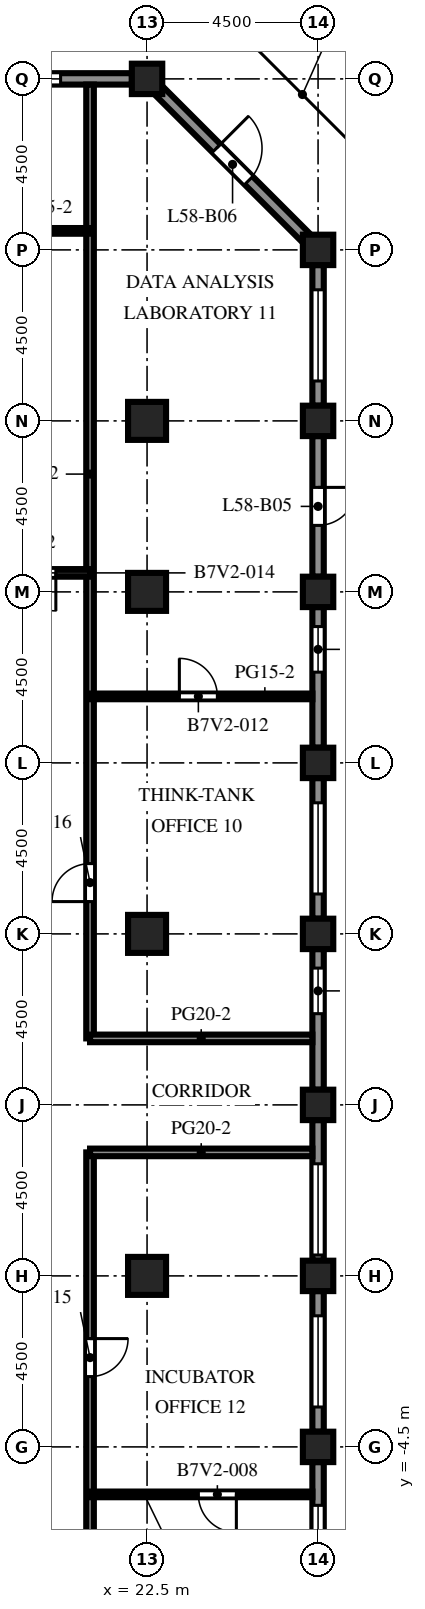
"""IFC4 building model, lengths in metres.
Left out: names, types, materials, properties, quantities, classifications, styles, units other than length and angle.
Written with IfcOpenShell. Run it as: python <this file> out.ifc"""

import sys

from ifc_helpers import new_model, si_unit, direction, frame, frame_2d, origin, origin_2d, place, context, subcontext, project, spatial, rectangle, extrude, element, fill, save


model = new_model("IFC4")
c1 = context("Model", 3, precision=1e-05, world=origin(), true_north=direction((0.0, 1.0)))
c2 = subcontext(c1, "Body", "Model", "MODEL_VIEW")
j1 = project(units=[si_unit("LENGTHUNIT", "METRE"), si_unit("PLANEANGLEUNIT", "RADIAN")], contexts=[c1])
p1 = place(None, origin())
s1 = spatial("IfcSite", under=j1, at=p1, CompositionType="ELEMENT")
p2 = place(p1, origin())
s2 = spatial("IfcBuilding", under=s1, at=p2, CompositionType="ELEMENT")
p3 = place(p2, frame((0.0, 0.0, 256.2)))
s3 = spatial("IfcBuildingStorey", under=s2, at=p3, CompositionType="ELEMENT", Elevation=256.2)
for number, where, z_axis, x_axis in (
    (1, (22.5, 31.5, 0.0), (0.0, 0.0, 1.0), (1.0, 0.0, 0.0)),
    (2, (27.0, -4.5, 0.0), (0.0, 0.0, 1.0), (1.0, 0.0, 0.0)),
    (3, (27.0, 0.0, 0.0), (0.0, 0.0, 1.0), (1.0, 0.0, 0.0)),
    (4, (27.0, 4.5, 0.0), (0.0, 0.0, 1.0), (1.0, 0.0, 0.0)),
    (5, (27.0, 9.0, 0.0), (0.0, 0.0, 1.0), (1.0, 0.0, 0.0)),
    (6, (27.0, 13.5, 0.0), (0.0, 0.0, 1.0), (1.0, 0.0, 0.0)),
    (7, (27.0, 18.0, 0.0), (0.0, 0.0, 1.0), (1.0, 0.0, 0.0)),
    (8, (27.0, 22.5, 0.0), (0.0, 0.0, 1.0), (1.0, 0.0, 0.0)),
    (9, (27.0, 27.0, 0.0), (0.0, 0.0, 1.0), (1.0, 0.0, 0.0)),
):
    element("IfcColumn", number, at=place(p3, frame(where, z_axis=z_axis, x_axis=x_axis)), inside=s3, PredefinedType="COLUMN", context=c2, shape_type="SweptSolid", body=[
        extrude(rectangle(XDim=0.8, YDim=0.8, at=origin_2d()), origin(), (0.0, 0.0, 1.0), 4.1),
    ])
for number, where, z_axis, x_axis in (
    (10, (22.5, 0.0, 0.0), (0.0, 0.0, 1.0), (1.0, 0.0, 0.0)),
    (11, (22.5, 9.0, 0.0), (0.0, 0.0, 1.0), (1.0, 0.0, 0.0)),
    (12, (22.5, 18.0, 0.0), (0.0, 0.0, 1.0), (1.0, 0.0, 0.0)),
    (13, (22.5, 22.5, 0.0), (0.0, 0.0, 1.0), (1.0, 0.0, 0.0)),
):
    element("IfcColumn", number, at=place(p3, frame(where, z_axis=z_axis, x_axis=x_axis)), inside=s3, PredefinedType="COLUMN", context=c2, shape_type="SweptSolid", body=[
        extrude(rectangle(XDim=1.0, YDim=1.0, at=origin_2d()), origin(), (0.0, 0.0, 1.0), 4.1),
    ])
p4 = place(p3, frame((27.0, -4.9, 0.0), z_axis=(0.0, 0.0, 1.0), x_axis=(0.0, -1.0, 0.0)))
e14 = element("IfcWall", 14, at=p4, inside=s3, PredefinedType="SOLIDWALL", context=c2, shape_type="SweptSolid", body=[
    extrude(rectangle(XDim=3.7, YDim=0.3, at=frame_2d((1.85, 0.0))), origin(), (0.0, 0.0, 1.0), 2.7),
])
p5 = place(p4, frame((1.137, 0.0, 0.8)))
e15 = element("IfcOpeningElement", 15, at=p5, cuts=e14, PredefinedType="OPENING", context=c2, shape_type="SweptSolid", body=[
    extrude(rectangle(XDim=2.4, YDim=1.7, at=frame_2d((1.2, 0.85))), frame((0.0, 0.16, 0.0), z_axis=(0.0, -1.0, 0.0), x_axis=(1.0, 0.0, 0.0)), (0.0, 0.0, 1.0), 0.32),
])
p6 = place(p3, frame((27.0, -0.4, 0.0), z_axis=(0.0, 0.0, 1.0), x_axis=(0.0, -1.0, 0.0)))
e16 = element("IfcWall", 16, at=p6, inside=s3, PredefinedType="SOLIDWALL", context=c2, shape_type="SweptSolid", body=[
    extrude(rectangle(XDim=3.7, YDim=0.3, at=frame_2d((1.85, 0.0))), origin(), (0.0, 0.0, 1.0), 2.7),
])
p7 = place(p6, frame((0.65, 0.0, 0.8)))
e17 = element("IfcOpeningElement", 17, at=p7, cuts=e16, PredefinedType="OPENING", context=c2, shape_type="SweptSolid", body=[
    extrude(rectangle(XDim=2.4, YDim=1.7, at=frame_2d((1.2, 0.85))), frame((0.0, 0.16, 0.0), z_axis=(0.0, -1.0, 0.0), x_axis=(1.0, 0.0, 0.0)), (0.0, 0.0, 1.0), 0.32),
])
p8 = place(p3, frame((27.0, 4.1, 0.0), z_axis=(0.0, 0.0, 1.0), x_axis=(0.0, -1.0, 0.0)))
e18 = element("IfcWall", 18, at=p8, inside=s3, PredefinedType="SOLIDWALL", context=c2, shape_type="SweptSolid", body=[
    extrude(rectangle(XDim=3.7, YDim=0.3, at=frame_2d((1.85, 0.0))), origin(), (0.0, 0.0, 1.0), 2.7),
])
p9 = place(p8, frame((1.15, 0.0, 0.8)))
e19 = element("IfcOpeningElement", 19, at=p9, cuts=e18, PredefinedType="OPENING", context=c2, shape_type="SweptSolid", body=[
    extrude(rectangle(XDim=2.4, YDim=1.7, at=frame_2d((1.2, 0.85))), frame((0.0, 0.16, 0.0), z_axis=(0.0, -1.0, 0.0), x_axis=(1.0, 0.0, 0.0)), (0.0, 0.0, 1.0), 0.32),
])
p10 = place(p3, frame((27.0, 8.6, 0.0), z_axis=(0.0, 0.0, 1.0), x_axis=(0.0, -1.0, 0.0)))
e20 = element("IfcWall", 20, at=p10, inside=s3, PredefinedType="SOLIDWALL", context=c2, shape_type="SweptSolid", body=[
    extrude(rectangle(XDim=3.7, YDim=0.3, at=frame_2d((1.85, 0.0))), origin(), (0.0, 0.0, 1.0), 2.7),
])
p11 = place(p10, frame((0.5, 0.0, 0.8)))
e21 = element("IfcOpeningElement", 21, at=p11, cuts=e20, PredefinedType="OPENING", context=c2, shape_type="SweptSolid", body=[
    extrude(rectangle(XDim=1.2, YDim=1.7, at=frame_2d((0.6, 0.85))), frame((0.0, 0.16, 0.0), z_axis=(0.0, -1.0, 0.0), x_axis=(1.0, 0.0, 0.0)), (0.0, 0.0, 1.0), 0.32),
])
p12 = place(p3, frame((27.0, 13.1, 0.0), z_axis=(0.0, 0.0, 1.0), x_axis=(0.0, -1.0, 0.0)))
e22 = element("IfcWall", 22, at=p12, inside=s3, PredefinedType="SOLIDWALL", context=c2, shape_type="SweptSolid", body=[
    extrude(rectangle(XDim=3.7, YDim=0.3, at=frame_2d((1.85, 0.0))), origin(), (0.0, 0.0, 1.0), 2.7),
])
p13 = place(p12, frame((0.65, 0.0, 0.8)))
e23 = element("IfcOpeningElement", 23, at=p13, cuts=e22, PredefinedType="OPENING", context=c2, shape_type="SweptSolid", body=[
    extrude(rectangle(XDim=2.4, YDim=1.7, at=frame_2d((1.2, 0.85))), frame((0.0, 0.16, 0.0), z_axis=(0.0, -1.0, 0.0), x_axis=(1.0, 0.0, 0.0)), (0.0, 0.0, 1.0), 0.32),
])
p14 = place(p3, frame((27.0, 17.6, 0.0), z_axis=(0.0, 0.0, 1.0), x_axis=(0.0, -1.0, 0.0)))
e24 = element("IfcWall", 24, at=p14, inside=s3, PredefinedType="SOLIDWALL", context=c2, shape_type="SweptSolid", body=[
    extrude(rectangle(XDim=3.7, YDim=0.3, at=frame_2d((1.85, 0.0))), origin(), (0.0, 0.0, 1.0), 2.7),
])
p15 = place(p14, frame((0.512, 0.0, 0.8)))
e25 = element("IfcOpeningElement", 25, at=p15, cuts=e24, PredefinedType="OPENING", context=c2, shape_type="SweptSolid", body=[
    extrude(rectangle(XDim=1.2, YDim=1.7, at=frame_2d((0.6, 0.85))), frame((0.0, 0.16, 0.0), z_axis=(0.0, -1.0, 0.0), x_axis=(1.0, 0.0, 0.0)), (0.0, 0.0, 1.0), 0.32),
])
p16 = place(p3, frame((27.0, 22.1, 0.0), z_axis=(0.0, 0.0, 1.0), x_axis=(0.0, -1.0, 0.0)))
e26 = element("IfcWall", 26, at=p16, inside=s3, PredefinedType="SOLIDWALL", context=c2, shape_type="SweptSolid", body=[
    extrude(rectangle(XDim=3.7, YDim=0.3, at=frame_2d((1.85, 0.0))), origin(), (0.0, 0.0, 1.0), 2.7),
])
p17 = place(p16, frame((1.35, 0.0, 0.0)))
e27 = element("IfcOpeningElement", 27, at=p17, cuts=e26, PredefinedType="OPENING", context=c2, shape_type="SweptSolid", body=[
    extrude(rectangle(XDim=1.0, YDim=2.2, at=frame_2d((0.5, 1.1))), frame((0.0, 0.16, 0.0), z_axis=(0.0, -1.0, 0.0), x_axis=(1.0, 0.0, 0.0)), (0.0, 0.0, 1.0), 0.32),
])
p18 = place(p3, frame((27.0, 26.6, 0.0), z_axis=(0.0, 0.0, 1.0), x_axis=(0.0, -1.0, 0.0)))
e28 = element("IfcWall", 28, at=p18, inside=s3, PredefinedType="SOLIDWALL", context=c2, shape_type="SweptSolid", body=[
    extrude(rectangle(XDim=3.7, YDim=0.3, at=frame_2d((1.85, 0.0))), origin(), (0.0, 0.0, 1.0), 2.7),
])
p19 = place(p18, frame((0.65, 0.0, 0.8)))
e29 = element("IfcOpeningElement", 29, at=p19, cuts=e28, PredefinedType="OPENING", context=c2, shape_type="SweptSolid", body=[
    extrude(rectangle(XDim=2.4, YDim=1.7, at=frame_2d((1.2, 0.85))), frame((0.0, 0.16, 0.0), z_axis=(0.0, -1.0, 0.0), x_axis=(1.0, 0.0, 0.0)), (0.0, 0.0, 1.0), 0.32),
])
p20 = place(p3, frame((22.794, 31.206, 0.0), z_axis=(0.0, 0.0, 1.0), x_axis=(0.707106781187, -0.707106781187, 0.0)))
e30 = element("IfcWall", 30, at=p20, inside=s3, PredefinedType="SOLIDWALL", context=c2, shape_type="SweptSolid", body=[
    extrude(rectangle(XDim=5.532, YDim=0.3, at=frame_2d((2.766, 0.0))), origin(), (0.0, 0.0, 1.0), 2.7),
])
p21 = place(p20, frame((2.166, 0.0, 0.0)))
e31 = element("IfcOpeningElement", 31, at=p21, cuts=e30, PredefinedType="OPENING", context=c2, shape_type="SweptSolid", body=[
    extrude(rectangle(XDim=1.2, YDim=2.2, at=frame_2d((0.6, 1.1))), frame((0.0, 0.16, 0.0), z_axis=(0.0, -1.0, 0.0), x_axis=(1.0, 0.0, 0.0)), (0.0, 0.0, 1.0), 0.32),
])
p22 = place(p3, frame((18.4, 31.5, 0.0), z_axis=(0.0, 0.0, 1.0), x_axis=(1.0, 0.0, 0.0)))
e32 = element("IfcWall", 32, at=p22, inside=s3, PredefinedType="SOLIDWALL", context=c2, shape_type="SweptSolid", body=[
    extrude(rectangle(XDim=3.7, YDim=0.3, at=frame_2d((1.85, 0.0))), origin(), (0.0, 0.0, 1.0), 2.7),
])
p23 = place(p22, frame((0.625, 0.0, 0.8)))
e33 = element("IfcOpeningElement", 33, at=p23, cuts=e32, PredefinedType="OPENING", context=c2, shape_type="SweptSolid", body=[
    extrude(rectangle(XDim=1.2, YDim=1.7, at=frame_2d((0.6, 0.85))), frame((0.0, 0.16, 0.0), z_axis=(0.0, -1.0, 0.0), x_axis=(1.0, 0.0, 0.0)), (0.0, 0.0, 1.0), 0.32),
])
p24 = place(p3, frame((21.0, 3.25, 0.0), z_axis=(0.0, 0.0, 1.0), x_axis=(0.0, -1.0, 0.0)))
e34 = element("IfcWall", 34, at=p24, inside=s3, PredefinedType="PARTITIONING", context=c2, shape_type="SweptSolid", body=[
    extrude(rectangle(XDim=25.6, YDim=0.2, at=frame_2d((12.8, 0.0))), origin(), (0.0, 0.0, 1.0), 3.5),
])
p25 = place(p24, frame((4.9, 0.0, 0.0)))
e35 = element("IfcOpeningElement", 35, at=p25, cuts=e34, PredefinedType="OPENING", context=c2, shape_type="SweptSolid", body=[
    extrude(rectangle(XDim=1.0, YDim=2.1, at=frame_2d((0.5, 1.05))), frame((0.0, 0.11, 0.0), z_axis=(0.0, -1.0, 0.0), x_axis=(1.0, 0.0, 0.0)), (0.0, 0.0, 1.0), 0.22),
])
p26 = place(p3, frame((21.0, 31.35, 0.0), z_axis=(0.0, 0.0, 1.0), x_axis=(0.0, -1.0, 0.0)))
e36 = element("IfcWall", 36, at=p26, inside=s3, PredefinedType="PARTITIONING", context=c2, shape_type="SweptSolid", body=[
    extrude(rectangle(XDim=25.1, YDim=0.2, at=frame_2d((12.55, 0.0))), origin(), (0.0, 0.0, 1.0), 3.5),
])
p27 = place(p26, frame((20.5, 0.0, 0.0)))
e37 = element("IfcOpeningElement", 37, at=p27, cuts=e36, PredefinedType="OPENING", context=c2, shape_type="SweptSolid", body=[
    extrude(rectangle(XDim=1.0, YDim=2.1, at=frame_2d((0.5, 1.05))), frame((0.0, 0.11, 0.0), z_axis=(0.0, -1.0, 0.0), x_axis=(1.0, 0.0, 0.0)), (0.0, 0.0, 1.0), 0.22),
])
p28 = place(p3, frame((26.85, -5.75, 0.0), z_axis=(0.0, 0.0, 1.0), x_axis=(-1.0, 0.0, 0.0)))
e38 = element("IfcWall", 38, at=p28, inside=s3, PredefinedType="PARTITIONING", context=c2, shape_type="SweptSolid", body=[
    extrude(rectangle(XDim=5.85, YDim=0.15, at=frame_2d((2.925, 0.0))), origin(), (0.0, 0.0, 1.0), 3.5),
])
p29 = place(p28, frame((2.0, 0.0, 0.0)))
e39 = element("IfcOpeningElement", 39, at=p29, cuts=e38, PredefinedType="OPENING", context=c2, shape_type="SweptSolid", body=[
    extrude(rectangle(XDim=1.0, YDim=2.1, at=frame_2d((0.5, 1.05))), frame((0.0, 0.085, 0.0), z_axis=(0.0, -1.0, 0.0), x_axis=(1.0, 0.0, 0.0)), (0.0, 0.0, 1.0), 0.17),
])
for number, where, z_axis, x_axis in (
    (40, (21.0, 3.25, 0.0), (0.0, 0.0, 1.0), (1.0, 0.0, 0.0)),
    (41, (21.0, 6.25, 0.0), (0.0, 0.0, 1.0), (1.0, 0.0, 0.0)),
):
    element("IfcWall", number, at=place(p3, frame(where, z_axis=z_axis, x_axis=x_axis)), inside=s3, PredefinedType="PARTITIONING", context=c2, shape_type="SweptSolid", body=[
        extrude(rectangle(XDim=5.85, YDim=0.2, at=frame_2d((2.925, 0.0))), origin(), (0.0, 0.0, 1.0), 3.5),
    ])
p30 = place(p3, frame((21.0, 15.25, 0.0), z_axis=(0.0, 0.0, 1.0), x_axis=(1.0, 0.0, 0.0)))
e42 = element("IfcWall", 42, at=p30, inside=s3, PredefinedType="PARTITIONING", context=c2, shape_type="SweptSolid", body=[
    extrude(rectangle(XDim=5.85, YDim=0.15, at=frame_2d((2.925, 0.0))), origin(), (0.0, 0.0, 1.0), 3.5),
])
p31 = place(p30, frame((2.35, 0.0, 0.0)))
e43 = element("IfcOpeningElement", 43, at=p31, cuts=e42, PredefinedType="OPENING", context=c2, shape_type="SweptSolid", body=[
    extrude(rectangle(XDim=1.0, YDim=2.1, at=frame_2d((0.5, 1.05))), frame((0.0, 0.085, 0.0), z_axis=(0.0, -1.0, 0.0), x_axis=(1.0, 0.0, 0.0)), (0.0, 0.0, 1.0), 0.17),
])
p32 = place(p3, frame((18.0, 18.5, 0.0), z_axis=(0.0, 0.0, 1.0), x_axis=(1.0, 0.0, 0.0)))
e44 = element("IfcWall", 44, at=p32, inside=s3, PredefinedType="PARTITIONING", context=c2, shape_type="SweptSolid", body=[
    extrude(rectangle(XDim=3.0, YDim=0.2, at=frame_2d((1.5, 0.0))), origin(), (0.0, 0.0, 1.0), 3.5),
])
p33 = place(p32, frame((1.1, 0.0, 0.0)))
e45 = element("IfcOpeningElement", 45, at=p33, cuts=e44, PredefinedType="OPENING", context=c2, shape_type="SweptSolid", body=[
    extrude(rectangle(XDim=1.0, YDim=2.1, at=frame_2d((0.5, 1.05))), frame((0.0, 0.11, 0.0), z_axis=(0.0, -1.0, 0.0), x_axis=(1.0, 0.0, 0.0)), (0.0, 0.0, 1.0), 0.22),
])
p34 = place(p3, frame((18.5, 27.5, 0.0), z_axis=(0.0, 0.0, 1.0), x_axis=(1.0, 0.0, 0.0)))
e46 = element("IfcWall", 46, at=p34, inside=s3, PredefinedType="PARTITIONING", context=c2, shape_type="SweptSolid", body=[
    extrude(rectangle(XDim=2.5, YDim=0.15, at=frame_2d((1.25, 0.0))), origin(), (0.0, 0.0, 1.0), 3.5),
])
p35 = place(p5, origin())
e47 = element("IfcWindow", 47, at=p35, inside=s3, PartitioningType="SINGLE_PANEL", PredefinedType="WINDOW", context=c2, shape_type="SweptSolid", body=[
    extrude(rectangle(XDim=2.4, YDim=1.7, at=frame_2d((1.2, 0.85))), frame((0.0, 0.03, 0.0), z_axis=(0.0, -1.0, 0.0), x_axis=(1.0, 0.0, 0.0)), (0.0, 0.0, 1.0), 0.06),
])
fill(e15, e47)
p36 = place(p7, origin())
e48 = element("IfcWindow", 48, at=p36, inside=s3, PartitioningType="SINGLE_PANEL", PredefinedType="WINDOW", context=c2, shape_type="SweptSolid", body=[
    extrude(rectangle(XDim=2.4, YDim=1.7, at=frame_2d((1.2, 0.85))), frame((0.0, 0.03, 0.0), z_axis=(0.0, -1.0, 0.0), x_axis=(1.0, 0.0, 0.0)), (0.0, 0.0, 1.0), 0.06),
])
fill(e17, e48)
p37 = place(p9, origin())
e49 = element("IfcWindow", 49, at=p37, inside=s3, PartitioningType="SINGLE_PANEL", PredefinedType="WINDOW", context=c2, shape_type="SweptSolid", body=[
    extrude(rectangle(XDim=2.4, YDim=1.7, at=frame_2d((1.2, 0.85))), frame((0.0, 0.03, 0.0), z_axis=(0.0, -1.0, 0.0), x_axis=(1.0, 0.0, 0.0)), (0.0, 0.0, 1.0), 0.06),
])
fill(e19, e49)
p38 = place(p11, origin())
e50 = element("IfcWindow", 50, at=p38, inside=s3, PartitioningType="SINGLE_PANEL", PredefinedType="WINDOW", context=c2, shape_type="SweptSolid", body=[
    extrude(rectangle(XDim=1.2, YDim=1.7, at=frame_2d((0.6, 0.85))), frame((0.0, 0.03, 0.0), z_axis=(0.0, -1.0, 0.0), x_axis=(1.0, 0.0, 0.0)), (0.0, 0.0, 1.0), 0.06),
])
fill(e21, e50)
p39 = place(p13, origin())
e51 = element("IfcWindow", 51, at=p39, inside=s3, PartitioningType="SINGLE_PANEL", PredefinedType="WINDOW", context=c2, shape_type="SweptSolid", body=[
    extrude(rectangle(XDim=2.4, YDim=1.7, at=frame_2d((1.2, 0.85))), frame((0.0, 0.03, 0.0), z_axis=(0.0, -1.0, 0.0), x_axis=(1.0, 0.0, 0.0)), (0.0, 0.0, 1.0), 0.06),
])
fill(e23, e51)
p40 = place(p15, origin())
e52 = element("IfcWindow", 52, at=p40, inside=s3, PartitioningType="SINGLE_PANEL", PredefinedType="WINDOW", context=c2, shape_type="SweptSolid", body=[
    extrude(rectangle(XDim=1.2, YDim=1.7, at=frame_2d((0.6, 0.85))), frame((0.0, 0.03, 0.0), z_axis=(0.0, -1.0, 0.0), x_axis=(1.0, 0.0, 0.0)), (0.0, 0.0, 1.0), 0.06),
])
fill(e25, e52)
p41 = place(p17, origin())
e53 = element("IfcDoor", 53, at=p41, inside=s3, OperationType="SINGLE_SWING_LEFT", PredefinedType="DOOR", context=c2, shape_type="SweptSolid", body=[
    extrude(rectangle(XDim=1.0, YDim=2.2, at=frame_2d((0.5, 1.1))), frame((0.0, 0.025, 0.0), z_axis=(0.0, -1.0, 0.0), x_axis=(1.0, 0.0, 0.0)), (0.0, 0.0, 1.0), 0.05),
])
fill(e27, e53)
p42 = place(p19, origin())
e54 = element("IfcWindow", 54, at=p42, inside=s3, PartitioningType="SINGLE_PANEL", PredefinedType="WINDOW", context=c2, shape_type="SweptSolid", body=[
    extrude(rectangle(XDim=2.4, YDim=1.7, at=frame_2d((1.2, 0.85))), frame((0.0, 0.03, 0.0), z_axis=(0.0, -1.0, 0.0), x_axis=(1.0, 0.0, 0.0)), (0.0, 0.0, 1.0), 0.06),
])
fill(e29, e54)
p43 = place(p21, origin())
e55 = element("IfcDoor", 55, at=p43, inside=s3, OperationType="SINGLE_SWING_LEFT", PredefinedType="DOOR", context=c2, shape_type="SweptSolid", body=[
    extrude(rectangle(XDim=1.2, YDim=2.2, at=frame_2d((0.6, 1.1))), frame((0.0, 0.025, 0.0), z_axis=(0.0, -1.0, 0.0), x_axis=(1.0, 0.0, 0.0)), (0.0, 0.0, 1.0), 0.05),
])
fill(e31, e55)
p44 = place(p23, origin())
e56 = element("IfcWindow", 56, at=p44, inside=s3, PartitioningType="SINGLE_PANEL", PredefinedType="WINDOW", context=c2, shape_type="SweptSolid", body=[
    extrude(rectangle(XDim=1.2, YDim=1.7, at=frame_2d((0.6, 0.85))), frame((0.0, 0.03, 0.0), z_axis=(0.0, -1.0, 0.0), x_axis=(1.0, 0.0, 0.0)), (0.0, 0.0, 1.0), 0.06),
])
fill(e33, e56)
p45 = place(p29, origin())
e57 = element("IfcDoor", 57, at=p45, inside=s3, OperationType="SINGLE_SWING_LEFT", PredefinedType="DOOR", context=c2, shape_type="SweptSolid", body=[
    extrude(rectangle(XDim=1.0, YDim=2.1, at=frame_2d((0.5, 1.05))), frame((0.0, 0.025, 0.0), z_axis=(0.0, -1.0, 0.0), x_axis=(1.0, 0.0, 0.0)), (0.0, 0.0, 1.0), 0.05),
])
fill(e39, e57)
p46 = place(p31, origin())
e58 = element("IfcDoor", 58, at=p46, inside=s3, OperationType="SINGLE_SWING_LEFT", PredefinedType="DOOR", context=c2, shape_type="SweptSolid", body=[
    extrude(rectangle(XDim=1.0, YDim=2.1, at=frame_2d((0.5, 1.05))), frame((0.0, 0.025, 0.0), z_axis=(0.0, -1.0, 0.0), x_axis=(1.0, 0.0, 0.0)), (0.0, 0.0, 1.0), 0.05),
])
fill(e43, e58)
p47 = place(p33, origin())
e59 = element("IfcDoor", 59, at=p47, inside=s3, OperationType="SINGLE_SWING_RIGHT", PredefinedType="DOOR", context=c2, shape_type="SweptSolid", body=[
    extrude(rectangle(XDim=1.0, YDim=2.1, at=frame_2d((0.5, 1.05))), frame((0.0, 0.025, 0.0), z_axis=(0.0, -1.0, 0.0), x_axis=(1.0, 0.0, 0.0)), (0.0, 0.0, 1.0), 0.05),
])
fill(e45, e59)
p48 = place(p25, origin())
e60 = element("IfcDoor", 60, at=p48, inside=s3, OperationType="SINGLE_SWING_LEFT", PredefinedType="DOOR", context=c2, shape_type="SweptSolid", body=[
    extrude(rectangle(XDim=1.0, YDim=2.1, at=frame_2d((0.5, 1.05))), frame((0.0, 0.025, 0.0), z_axis=(0.0, -1.0, 0.0), x_axis=(1.0, 0.0, 0.0)), (0.0, 0.0, 1.0), 0.05),
])
fill(e35, e60)
p49 = place(p27, origin())
e61 = element("IfcDoor", 61, at=p49, inside=s3, OperationType="SINGLE_SWING_RIGHT", PredefinedType="DOOR", context=c2, shape_type="SweptSolid", body=[
    extrude(rectangle(XDim=1.0, YDim=2.1, at=frame_2d((0.5, 1.05))), frame((0.0, 0.025, 0.0), z_axis=(0.0, -1.0, 0.0), x_axis=(1.0, 0.0, 0.0)), (0.0, 0.0, 1.0), 0.05),
])
fill(e37, e61)
save(model, sys.argv[1])
